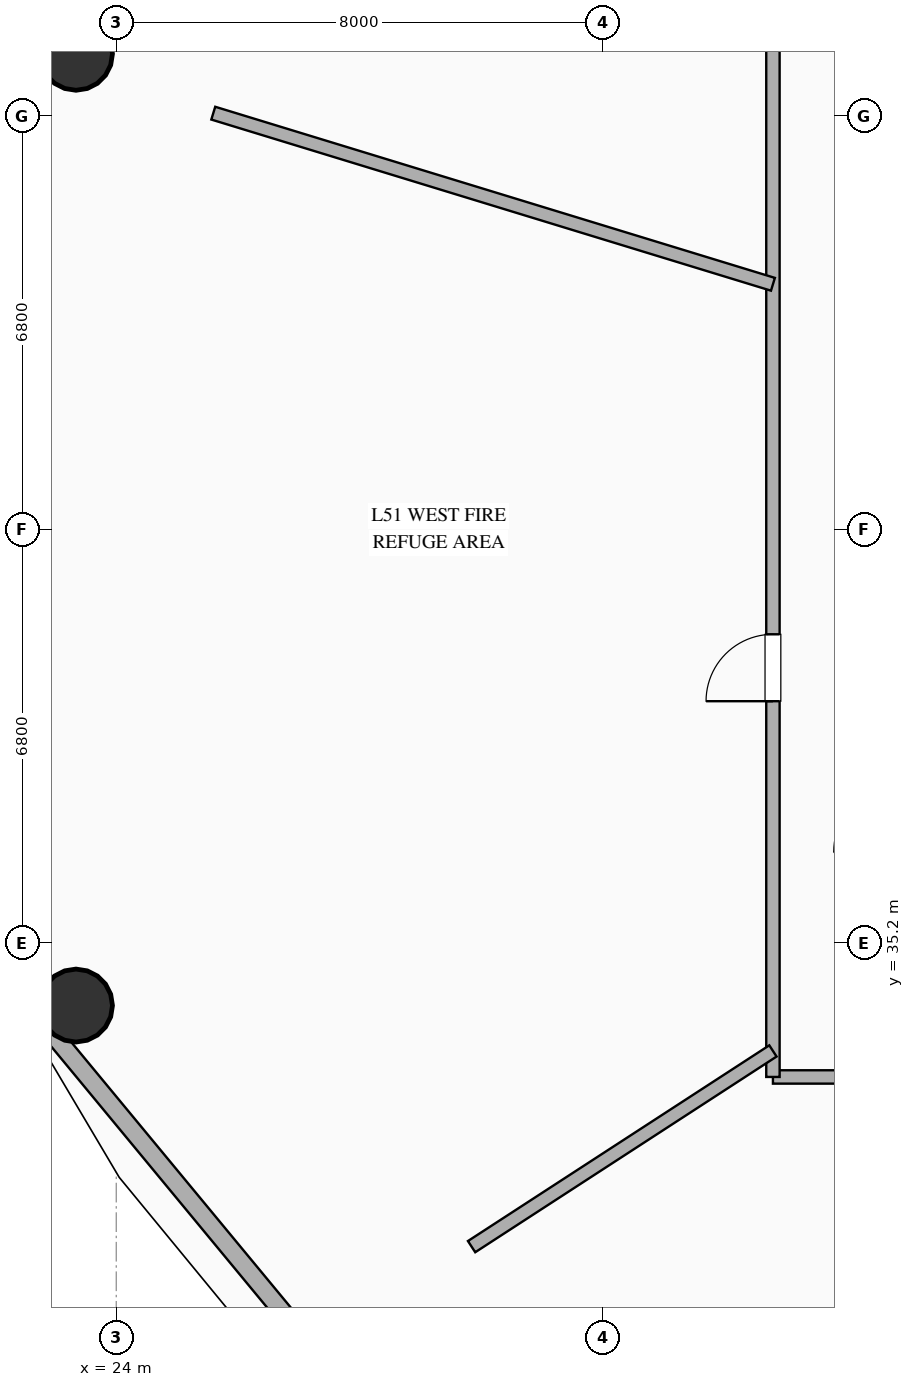
"""IFC4 building model, lengths in metres.
Left out: names, types, materials, properties, quantities, classifications, styles, units other than length and angle.
Written with IfcOpenShell. Run it as: python <this file> out.ifc"""

import sys

from ifc_helpers import new_model, si_unit, direction, frame, frame_2d, origin, origin_2d, place, context, subcontext, project, spatial, rectangle, hollow_circle, extrude, element, fill, save


model = new_model("IFC4")
c1 = context("Model", 3, precision=1e-05, world=origin(), true_north=direction((0.0, 1.0)))
c2 = subcontext(c1, "Body", "Model", "MODEL_VIEW")
j1 = project(units=[si_unit("LENGTHUNIT", "METRE"), si_unit("PLANEANGLEUNIT", "RADIAN")], contexts=[c1])
p1 = place(None, origin())
s1 = spatial("IfcSite", under=j1, at=p1, CompositionType="ELEMENT")
p2 = place(p1, origin())
s2 = spatial("IfcBuilding", under=s1, at=p2, CompositionType="ELEMENT")
p3 = place(p2, frame((0.0, 0.0, 201.0)))
s3 = spatial("IfcBuildingStorey", under=s2, at=p3, CompositionType="ELEMENT", Elevation=201.0)
for number, where, z_axis, x_axis in (
    (1, (23.338, 49.826, 0.0), (0.0, 0.0, 1.0), (1.0, 0.0, 0.0)),
    (2, (23.338, 34.174, 0.0), (0.0, 0.0, 1.0), (1.0, 0.0, 0.0)),
):
    element("IfcColumn", number, at=place(p3, frame(where, z_axis=z_axis, x_axis=x_axis)), inside=s3, PredefinedType="COLUMN", context=c2, shape_type="SweptSolid", body=[
        extrude(hollow_circle(Radius=0.6, WallThickness=0.032, at=origin_2d()), origin(), (0.0, 0.0, 1.0), 5.15),
    ])
p4 = place(p3, frame((22.768, 33.933, 0.0), z_axis=(0.0, 0.0, 1.0), x_axis=(0.637333477683, -0.770588111915, 0.0)))
e3 = element("IfcWall", 3, at=p4, inside=s3, PredefinedType="SOLIDWALL", context=c2, shape_type="SweptSolid", body=[
    extrude(rectangle(XDim=8.875, YDim=0.3, at=frame_2d((4.438, 0.0))), origin(), (0.0, 0.0, 1.0), 5.15),
])
p5 = place(p3, frame((61.2, 33.0, 0.0), z_axis=(0.0, 0.0, 1.0), x_axis=(-1.0, 0.0, 0.0)))
e4 = element("IfcWall", 4, at=p5, inside=s3, PredefinedType="SOLIDWALL", context=c2, shape_type="SweptSolid", body=[
    extrude(rectangle(XDim=26.4, YDim=0.22, at=frame_2d((13.2, 0.0))), origin(), (0.0, 0.0, 1.0), 3.45),
])
p6 = place(p5, frame((18.195, 0.0, 0.0)))
e5 = element("IfcOpeningElement", 5, at=p6, cuts=e4, PredefinedType="OPENING", context=c2, shape_type="SweptSolid", body=[
    extrude(rectangle(XDim=1.1, YDim=2.15, at=frame_2d((0.55, 1.075))), frame((0.0, 0.12, 0.0), z_axis=(0.0, -1.0, 0.0), x_axis=(1.0, 0.0, 0.0)), (0.0, 0.0, 1.0), 0.24),
])
p7 = place(p5, frame((5.028, 0.0, 0.0)))
e6 = element("IfcOpeningElement", 6, at=p7, cuts=e4, PredefinedType="OPENING", context=c2, shape_type="SweptSolid", body=[
    extrude(rectangle(XDim=1.1, YDim=2.15, at=frame_2d((0.55, 1.075))), frame((0.0, 0.12, 0.0), z_axis=(0.0, -1.0, 0.0), x_axis=(1.0, 0.0, 0.0)), (0.0, 0.0, 1.0), 0.24),
])
p8 = place(p3, frame((34.8, 33.0, 0.0), z_axis=(0.0, 0.0, 1.0), x_axis=(0.0, 1.0, 0.0)))
e7 = element("IfcWall", 7, at=p8, inside=s3, PredefinedType="SOLIDWALL", context=c2, shape_type="SweptSolid", body=[
    extrude(rectangle(XDim=18.0, YDim=0.22, at=frame_2d((9.0, 0.0))), origin(), (0.0, 0.0, 1.0), 3.45),
])
p9 = place(p8, frame((6.179, 0.0, 0.0)))
e8 = element("IfcOpeningElement", 8, at=p9, cuts=e7, PredefinedType="OPENING", context=c2, shape_type="SweptSolid", body=[
    extrude(rectangle(XDim=1.1, YDim=2.15, at=frame_2d((0.55, 1.075))), frame((0.0, 0.12, 0.0), z_axis=(0.0, -1.0, 0.0), x_axis=(1.0, 0.0, 0.0)), (0.0, 0.0, 1.0), 0.24),
])
p10 = place(p3, frame((34.8, 46.036, 0.0), z_axis=(0.0, 0.0, 1.0), x_axis=(-0.956307255346, 0.292363529485, 0.0)))
e9 = element("IfcWall", 9, at=p10, inside=s3, PredefinedType="SOLIDWALL", context=c2, shape_type="SweptSolid", body=[
    extrude(rectangle(XDim=9.625, YDim=0.22, at=frame_2d((4.812, 0.0))), origin(), (0.0, 0.0, 1.0), 3.45),
])
p11 = place(p3, frame((34.8, 33.428, 0.0), z_axis=(0.0, 0.0, 1.0), x_axis=(-0.838670079977, -0.54463978642, 0.0)))
e10 = element("IfcWall", 10, at=p11, inside=s3, PredefinedType="SOLIDWALL", context=c2, shape_type="SweptSolid", body=[
    extrude(rectangle(XDim=5.909, YDim=0.22, at=frame_2d((2.955, 0.0))), origin(), (0.0, 0.0, 1.0), 3.45),
])
p12 = place(p9, origin())
e11 = element("IfcDoor", 11, at=p12, inside=s3, OperationType="SINGLE_SWING_LEFT", PredefinedType="DOOR", context=c2, shape_type="SweptSolid", body=[
    extrude(rectangle(XDim=1.1, YDim=2.15, at=frame_2d((0.55, 1.075))), frame((0.0, 0.025, 0.0), z_axis=(0.0, -1.0, 0.0), x_axis=(1.0, 0.0, 0.0)), (0.0, 0.0, 1.0), 0.05),
])
fill(e8, e11)
save(model, sys.argv[1])
